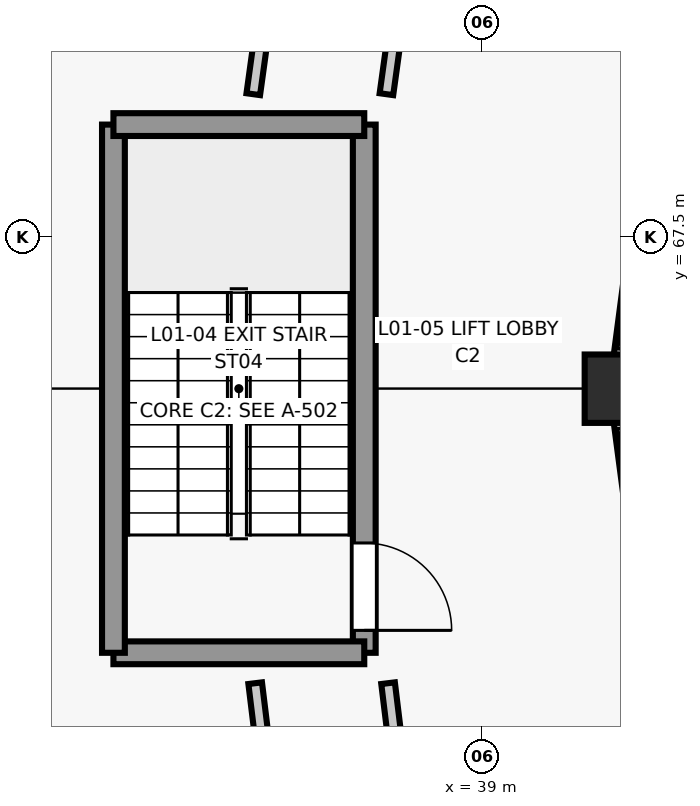
"""IFC4 building model, lengths in metres.
Left out: names, types, materials, properties, quantities, classifications, styles, units other than length and angle.
Written with IfcOpenShell. Run it as: python <this file> out.ifc"""

import sys

from ifc_helpers import new_model, si_unit, direction, frame, frame_2d, origin, origin_2d, place, context, subcontext, project, spatial, rectangle, circle, extrude, element, fill, save


model = new_model("IFC4")
c1 = context("Model", 3, precision=1e-05, world=origin(), true_north=direction((0.0, 1.0)))
c2 = subcontext(c1, "Body", "Model", "MODEL_VIEW")
j1 = project(units=[si_unit("LENGTHUNIT", "METRE"), si_unit("PLANEANGLEUNIT", "RADIAN")], contexts=[c1])
p1 = place(None, origin())
s1 = spatial("IfcSite", under=j1, at=p1, CompositionType="ELEMENT")
p2 = place(p1, origin())
s2 = spatial("IfcBuilding", under=s1, at=p2, CompositionType="ELEMENT")
p3 = place(p2, frame((0.0, 0.0, 4.5)))
s3 = spatial("IfcBuildingStorey", under=s2, at=p3, CompositionType="ELEMENT", Elevation=4.5)
p4 = place(p3, frame((40.8, 65.5, 0.0), z_axis=(0.0, 0.0, 1.0), x_axis=(1.0, 0.0, 0.0)))
e1 = element("IfcColumn", 1, at=p4, inside=s3, PredefinedType="COLUMN", context=c2, shape_type="SweptSolid", body=[
    extrude(circle(Radius=0.45, at=origin_2d()), origin(), (0.0, 0.0, 1.0), 4.2),
])
p5 = place(p3, frame((31.963, 65.975, 0.0), z_axis=(0.0, 0.0, 1.0), x_axis=(0.130513242145, 0.991446566197, 0.0)))
e2 = element("IfcWall", 2, at=p5, inside=s3, PredefinedType="STANDARD", context=c2, shape_type="SweptSolid", body=[
    extrude(rectangle(XDim=11.076, YDim=0.28, at=frame_2d((5.538, 0.0))), origin(), (0.0, 0.0, 1.0), 0.82),
])
p6 = place(p3, frame((42.031, 74.853, 0.0), z_axis=(0.0, 0.0, 1.0), x_axis=(-0.130549698469, -0.991441766434, 0.0)))
e3 = element("IfcWall", 3, at=p6, inside=s3, PredefinedType="STANDARD", context=c2, shape_type="SweptSolid", body=[
    extrude(rectangle(XDim=9.156, YDim=0.25, at=frame_2d((4.578, 0.0))), origin(), (0.0, 0.0, 1.0), 0.82),
])
p7 = place(p3, frame((33.408, 54.044, 0.0), z_axis=(0.0, 0.0, 1.0), x_axis=(-0.130513242145, 0.991446566197, 0.0)))
e4 = element("IfcWall", 4, at=p7, inside=s3, PredefinedType="STANDARD", context=c2, shape_type="SweptSolid", body=[
    extrude(rectangle(XDim=11.076, YDim=0.32, at=frame_2d((5.538, 0.0))), origin(), (0.0, 0.0, 1.0), 3.066),
])
p8 = place(p7, frame((4.838, 0.0, 0.85)))
e5 = element("IfcOpeningElement", 5, at=p8, cuts=e4, PredefinedType="OPENING", context=c2, shape_type="SweptSolid", body=[
    extrude(rectangle(XDim=1.4, YDim=1.4, at=frame_2d((0.7, 0.7))), frame((0.0, 0.17, 0.0), z_axis=(0.0, -1.0, 0.0), x_axis=(1.0, 0.0, 0.0)), (0.0, 0.0, 1.0), 0.34),
])
p9 = place(p3, frame((40.836, 65.225, 0.0), z_axis=(0.0, 0.0, 1.0), x_axis=(0.130549698469, -0.991441766434, 0.0)))
e6 = element("IfcWall", 6, at=p9, inside=s3, PredefinedType="STANDARD", context=c2, shape_type="SweptSolid", body=[
    extrude(rectangle(XDim=9.156, YDim=0.25, at=frame_2d((4.578, 0.0))), origin(), (0.0, 0.0, 1.0), 0.82),
])
p10 = place(p3, frame((37.45, 68.975, 0.0), z_axis=(0.0, 0.0, 1.0), x_axis=(0.0, -1.0, 0.0)))
e7 = element("IfcWall", 7, at=p10, inside=s3, PredefinedType="SHEAR", context=c2, shape_type="SweptSolid", body=[
    extrude(rectangle(XDim=6.95, YDim=0.3, at=frame_2d((3.475, 0.0))), origin(), (0.0, 0.0, 1.0), 4.2),
])
p11 = place(p10, frame((5.505, 0.0, 0.0)))
e8 = element("IfcOpeningElement", 8, at=p11, cuts=e7, PredefinedType="OPENING", context=c2, shape_type="SweptSolid", body=[
    extrude(rectangle(XDim=1.15, YDim=2.15, at=frame_2d((0.575, 1.075))), frame((0.0, 0.16, 0.0), z_axis=(0.0, -1.0, 0.0), x_axis=(1.0, 0.0, 0.0)), (0.0, 0.0, 1.0), 0.32),
])
p12 = place(p3, frame((37.45, 62.025, 0.0), z_axis=(0.0, 0.0, 1.0), x_axis=(-1.0, 0.0, 0.0)))
e9 = element("IfcWall", 9, at=p12, inside=s3, PredefinedType="SHEAR", context=c2, shape_type="SweptSolid", body=[
    extrude(rectangle(XDim=3.3, YDim=0.3, at=frame_2d((1.65, 0.0))), origin(), (0.0, 0.0, 1.0), 4.2),
])
p13 = place(p3, frame((34.15, 62.025, 0.0), z_axis=(0.0, 0.0, 1.0), x_axis=(0.0, 1.0, 0.0)))
e10 = element("IfcWall", 10, at=p13, inside=s3, PredefinedType="SHEAR", context=c2, shape_type="SweptSolid", body=[
    extrude(rectangle(XDim=6.95, YDim=0.3, at=frame_2d((3.475, 0.0))), origin(), (0.0, 0.0, 1.0), 4.2),
])
p14 = place(p3, frame((34.15, 68.975, 0.0), z_axis=(0.0, 0.0, 1.0), x_axis=(1.0, 0.0, 0.0)))
e11 = element("IfcWall", 11, at=p14, inside=s3, PredefinedType="SHEAR", context=c2, shape_type="SweptSolid", body=[
    extrude(rectangle(XDim=3.3, YDim=0.3, at=frame_2d((1.65, 0.0))), origin(), (0.0, 0.0, 1.0), 4.2),
])
p15 = place(p3, frame((37.001, 76.695, 0.0), z_axis=(0.0, 0.0, 1.0), x_axis=(-0.136812919882, -0.990596903363, 0.0)))
e12 = element("IfcWall", 12, at=p15, inside=s3, PredefinedType="PARTITIONING", context=c2, shape_type="SweptSolid", body=[
    extrude(rectangle(XDim=7.39, YDim=0.18, at=frame_2d((3.695, 0.0))), origin(), (0.0, 0.0, 1.0), 3.855),
])
p16 = place(p15, frame((2.945, 0.0, 0.0)))
e13 = element("IfcOpeningElement", 13, at=p16, cuts=e12, PredefinedType="OPENING", context=c2, shape_type="SweptSolid", body=[
    extrude(rectangle(XDim=1.5, YDim=2.15, at=frame_2d((0.75, 1.075))), frame((0.0, 0.1, 0.0), z_axis=(0.0, -1.0, 0.0), x_axis=(1.0, 0.0, 0.0)), (0.0, 0.0, 1.0), 0.2),
])
p17 = place(p3, frame((38.689, 76.234, 0.0), z_axis=(0.0, 0.0, 1.0), x_axis=(-0.136839031307, -0.990593296722, 0.0)))
e14 = element("IfcWall", 14, at=p17, inside=s3, PredefinedType="PARTITIONING", context=c2, shape_type="SweptSolid", body=[
    extrude(rectangle(XDim=6.924, YDim=0.18, at=frame_2d((3.462, 0.0))), origin(), (0.0, 0.0, 1.0), 3.855),
])
p18 = place(p17, frame((2.737, 0.0, 0.0)))
e15 = element("IfcOpeningElement", 15, at=p18, cuts=e14, PredefinedType="OPENING", context=c2, shape_type="SweptSolid", body=[
    extrude(rectangle(XDim=1.45, YDim=2.2, at=frame_2d((0.725, 1.1))), frame((0.0, 0.1, 0.0), z_axis=(0.0, -1.0, 0.0), x_axis=(1.0, 0.0, 0.0)), (0.0, 0.0, 1.0), 0.2),
])
p19 = place(p3, frame((36.015, 61.625, 0.0), z_axis=(0.0, 0.0, 1.0), x_axis=(0.121095426368, -0.992640870463, 0.0)))
e16 = element("IfcWall", 16, at=p19, inside=s3, PredefinedType="PARTITIONING", context=c2, shape_type="SweptSolid", body=[
    extrude(rectangle(XDim=6.718, YDim=0.18, at=frame_2d((3.359, 0.0))), origin(), (0.0, 0.0, 1.0), 3.855),
])
p20 = place(p19, frame((2.884, 0.0, 0.0)))
e17 = element("IfcOpeningElement", 17, at=p20, cuts=e16, PredefinedType="OPENING", context=c2, shape_type="SweptSolid", body=[
    extrude(rectangle(XDim=0.95, YDim=2.1, at=frame_2d((0.475, 1.05))), frame((0.0, 0.1, 0.0), z_axis=(0.0, -1.0, 0.0), x_axis=(1.0, 0.0, 0.0)), (0.0, 0.0, 1.0), 0.2),
])
p21 = place(p3, frame((37.763, 61.625, 0.0), z_axis=(0.0, 0.0, 1.0), x_axis=(0.12105344106, -0.992645991483, 0.0)))
e18 = element("IfcWall", 18, at=p21, inside=s3, PredefinedType="PARTITIONING", context=c2, shape_type="SweptSolid", body=[
    extrude(rectangle(XDim=6.28, YDim=0.18, at=frame_2d((3.14, 0.0))), origin(), (0.0, 0.0, 1.0), 3.855),
])
p22 = place(p21, frame((2.615, 0.0, 0.0)))
e19 = element("IfcOpeningElement", 19, at=p22, cuts=e18, PredefinedType="OPENING", context=c2, shape_type="SweptSolid", body=[
    extrude(rectangle(XDim=1.05, YDim=2.1, at=frame_2d((0.525, 1.05))), frame((0.0, 0.1, 0.0), z_axis=(0.0, -1.0, 0.0), x_axis=(1.0, 0.0, 0.0)), (0.0, 0.0, 1.0), 0.2),
])
p23 = place(p11, origin())
e20 = element("IfcDoor", 20, at=p23, inside=s3, OperationType="SINGLE_SWING_RIGHT", PredefinedType="DOOR", context=c2, shape_type="SweptSolid", body=[
    extrude(rectangle(XDim=1.15, YDim=2.15, at=frame_2d((0.575, 1.075))), frame((0.0, 0.025, 0.0), z_axis=(0.0, -1.0, 0.0), x_axis=(1.0, 0.0, 0.0)), (0.0, 0.0, 1.0), 0.05),
])
fill(e8, e20)
save(model, sys.argv[1])
